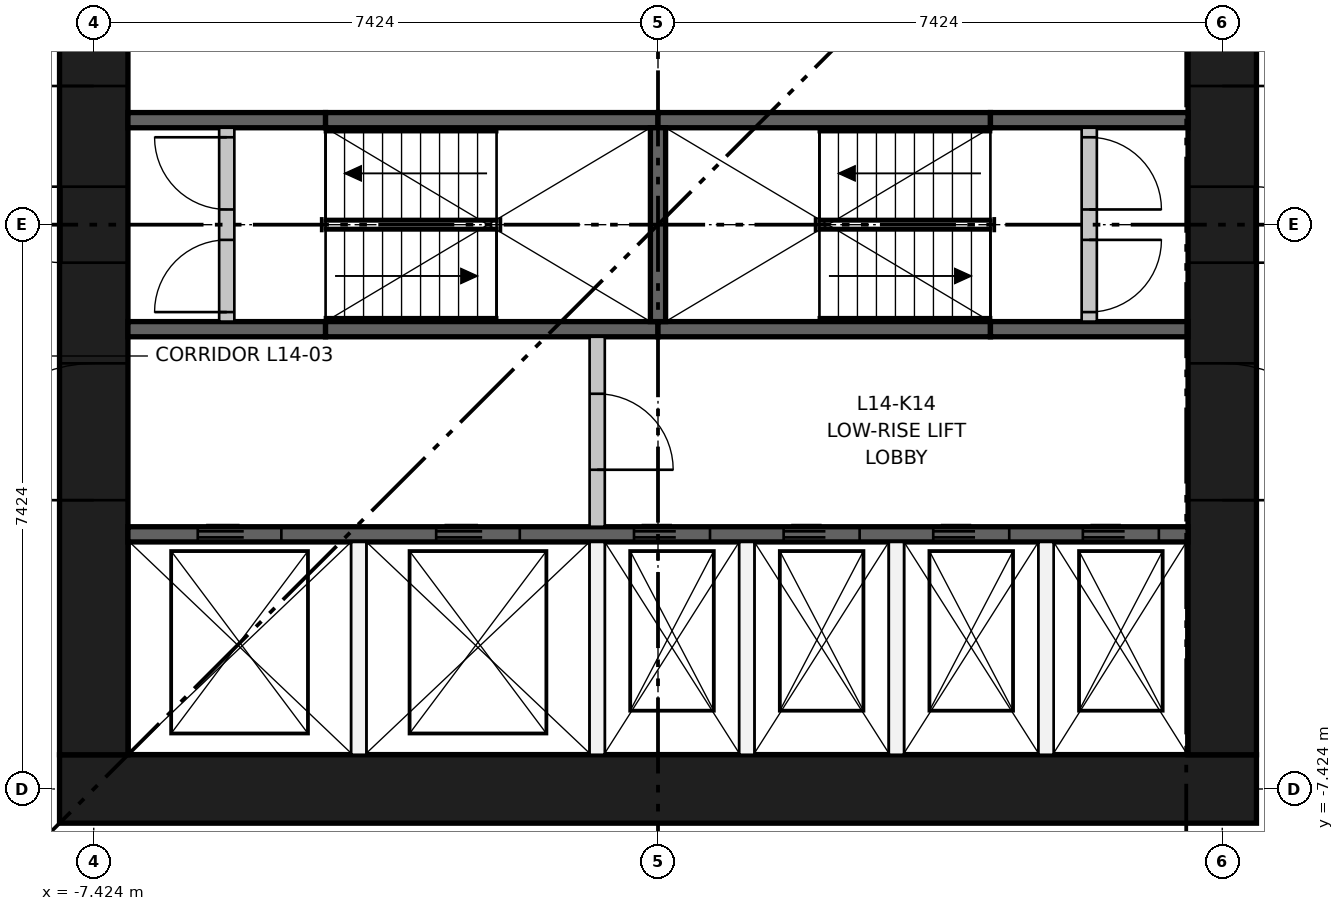
"""IFC4 building model, lengths in metres.
Left out: names, types, materials, properties, quantities, classifications, styles, units other than length and angle.
Written with IfcOpenShell. Run it as: python <this file> out.ifc"""

import sys

from ifc_helpers import new_model, si_unit, direction, frame, frame_2d, origin, place, context, subcontext, project, spatial, rectangle, extrude, element, fill, save


model = new_model("IFC4")
c1 = context("Model", 3, precision=1e-05, world=origin(), true_north=direction((0.0, 1.0)))
c2 = subcontext(c1, "Body", "Model", "MODEL_VIEW")
j1 = project(units=[si_unit("LENGTHUNIT", "METRE"), si_unit("PLANEANGLEUNIT", "RADIAN")], contexts=[c1])
p1 = place(None, origin())
s1 = spatial("IfcSite", under=j1, at=p1, CompositionType="ELEMENT")
p2 = place(p1, origin())
s2 = spatial("IfcBuilding", under=s1, at=p2, CompositionType="ELEMENT")
p3 = place(p2, frame((0.0, 0.0, 55.4)))
s3 = spatial("IfcBuildingStorey", under=s2, at=p3, CompositionType="ELEMENT", Elevation=55.4)
p4 = place(p3, frame((-7.874, -7.424, 0.0), z_axis=(0.0, 0.0, 1.0), x_axis=(1.0, 0.0, 0.0)))
e1 = element("IfcWall", 1, at=p4, inside=s3, PredefinedType="SHEAR", context=c2, shape_type="SweptSolid", body=[
    extrude(rectangle(XDim=15.748, YDim=0.9, at=frame_2d((7.874, 0.0))), origin(), (0.0, 0.0, 1.0), 3.65),
])
p5 = place(p3, frame((-7.424, -6.974, 0.0), z_axis=(0.0, 0.0, 1.0), x_axis=(0.0, 1.0, 0.0)))
e2 = element("IfcWall", 2, at=p5, inside=s3, PredefinedType="SHEAR", context=c2, shape_type="SweptSolid", body=[
    extrude(rectangle(XDim=13.948, YDim=0.9, at=frame_2d((6.974, 0.0))), origin(), (0.0, 0.0, 1.0), 3.65),
])
p6 = place(p5, frame((6.474, 0.0, 0.0)))
e3 = element("IfcOpeningElement", 3, at=p6, cuts=e2, PredefinedType="OPENING", context=c2, shape_type="SweptSolid", body=[
    extrude(rectangle(XDim=1.0, YDim=2.1, at=frame_2d((0.5, 1.05))), frame((0.0, 0.46, 0.0), z_axis=(0.0, -1.0, 0.0), x_axis=(1.0, 0.0, 0.0)), (0.0, 0.0, 1.0), 0.92),
])
p7 = place(p5, frame((3.35, 0.0, 0.0)))
e4 = element("IfcOpeningElement", 4, at=p7, cuts=e2, PredefinedType="OPENING", context=c2, shape_type="SweptSolid", body=[
    extrude(rectangle(XDim=1.8, YDim=2.1, at=frame_2d((0.9, 1.05))), frame((0.0, 0.46, 0.0), z_axis=(0.0, -1.0, 0.0), x_axis=(1.0, 0.0, 0.0)), (0.0, 0.0, 1.0), 0.92),
])
p8 = place(p5, frame((8.799, 0.0, 0.0)))
e5 = element("IfcOpeningElement", 5, at=p8, cuts=e2, PredefinedType="OPENING", context=c2, shape_type="SweptSolid", body=[
    extrude(rectangle(XDim=1.8, YDim=2.1, at=frame_2d((0.9, 1.05))), frame((0.0, 0.46, 0.0), z_axis=(0.0, -1.0, 0.0), x_axis=(1.0, 0.0, 0.0)), (0.0, 0.0, 1.0), 0.92),
])
p9 = place(p5, frame((11.974, 0.0, 0.0)))
e6 = element("IfcOpeningElement", 6, at=p9, cuts=e2, PredefinedType="OPENING", context=c2, shape_type="SweptSolid", body=[
    extrude(rectangle(XDim=1.0, YDim=2.1, at=frame_2d((0.5, 1.05))), frame((0.0, 0.46, 0.0), z_axis=(0.0, -1.0, 0.0), x_axis=(1.0, 0.0, 0.0)), (0.0, 0.0, 1.0), 0.92),
])
p10 = place(p3, frame((7.424, -6.974, 0.0), z_axis=(0.0, 0.0, 1.0), x_axis=(0.0, 1.0, 0.0)))
e7 = element("IfcWall", 7, at=p10, inside=s3, PredefinedType="SHEAR", context=c2, shape_type="SweptSolid", body=[
    extrude(rectangle(XDim=13.948, YDim=0.9, at=frame_2d((6.974, 0.0))), origin(), (0.0, 0.0, 1.0), 3.65),
])
p11 = place(p10, frame((6.474, 0.0, 0.0)))
e8 = element("IfcOpeningElement", 8, at=p11, cuts=e7, PredefinedType="OPENING", context=c2, shape_type="SweptSolid", body=[
    extrude(rectangle(XDim=1.0, YDim=2.1, at=frame_2d((0.5, 1.05))), frame((0.0, 0.46, 0.0), z_axis=(0.0, -1.0, 0.0), x_axis=(1.0, 0.0, 0.0)), (0.0, 0.0, 1.0), 0.92),
])
p12 = place(p10, frame((3.35, 0.0, 0.0)))
e9 = element("IfcOpeningElement", 9, at=p12, cuts=e7, PredefinedType="OPENING", context=c2, shape_type="SweptSolid", body=[
    extrude(rectangle(XDim=1.8, YDim=2.1, at=frame_2d((0.9, 1.05))), frame((0.0, 0.46, 0.0), z_axis=(0.0, -1.0, 0.0), x_axis=(1.0, 0.0, 0.0)), (0.0, 0.0, 1.0), 0.92),
])
p13 = place(p10, frame((8.799, 0.0, 0.0)))
e10 = element("IfcOpeningElement", 10, at=p13, cuts=e7, PredefinedType="OPENING", context=c2, shape_type="SweptSolid", body=[
    extrude(rectangle(XDim=1.8, YDim=2.1, at=frame_2d((0.9, 1.05))), frame((0.0, 0.46, 0.0), z_axis=(0.0, -1.0, 0.0), x_axis=(1.0, 0.0, 0.0)), (0.0, 0.0, 1.0), 0.92),
])
p14 = place(p3, frame((-6.974, -4.074, 0.0), z_axis=(0.0, 0.0, 1.0), x_axis=(1.0, 0.0, 0.0)))
e11 = element("IfcWall", 11, at=p14, inside=s3, PredefinedType="SHEAR", context=c2, shape_type="SweptSolid", body=[
    extrude(rectangle(XDim=13.948, YDim=0.2, at=frame_2d((6.974, 0.0))), origin(), (0.0, 0.0, 1.0), 3.3),
])
p15 = place(p14, frame((0.918, 0.0, 0.0)))
e12 = element("IfcOpeningElement", 12, at=p15, cuts=e11, PredefinedType="OPENING", context=c2, shape_type="SweptSolid", body=[
    extrude(rectangle(XDim=1.1, YDim=2.1, at=frame_2d((0.55, 1.05))), frame((0.0, 0.11, 0.0), z_axis=(0.0, -1.0, 0.0), x_axis=(1.0, 0.0, 0.0)), (0.0, 0.0, 1.0), 0.22),
])
p16 = place(p14, frame((4.055, 0.0, 0.0)))
e13 = element("IfcOpeningElement", 13, at=p16, cuts=e11, PredefinedType="OPENING", context=c2, shape_type="SweptSolid", body=[
    extrude(rectangle(XDim=1.1, YDim=2.1, at=frame_2d((0.55, 1.05))), frame((0.0, 0.11, 0.0), z_axis=(0.0, -1.0, 0.0), x_axis=(1.0, 0.0, 0.0)), (0.0, 0.0, 1.0), 0.22),
])
p17 = place(p14, frame((6.658, 0.0, 0.0)))
e14 = element("IfcOpeningElement", 14, at=p17, cuts=e11, PredefinedType="OPENING", context=c2, shape_type="SweptSolid", body=[
    extrude(rectangle(XDim=1.0, YDim=2.1, at=frame_2d((0.5, 1.05))), frame((0.0, 0.11, 0.0), z_axis=(0.0, -1.0, 0.0), x_axis=(1.0, 0.0, 0.0)), (0.0, 0.0, 1.0), 0.22),
])
p18 = place(p14, frame((8.627, 0.0, 0.0)))
e15 = element("IfcOpeningElement", 15, at=p18, cuts=e11, PredefinedType="OPENING", context=c2, shape_type="SweptSolid", body=[
    extrude(rectangle(XDim=1.0, YDim=2.1, at=frame_2d((0.5, 1.05))), frame((0.0, 0.11, 0.0), z_axis=(0.0, -1.0, 0.0), x_axis=(1.0, 0.0, 0.0)), (0.0, 0.0, 1.0), 0.22),
])
p19 = place(p14, frame((10.595, 0.0, 0.0)))
e16 = element("IfcOpeningElement", 16, at=p19, cuts=e11, PredefinedType="OPENING", context=c2, shape_type="SweptSolid", body=[
    extrude(rectangle(XDim=1.0, YDim=2.1, at=frame_2d((0.5, 1.05))), frame((0.0, 0.11, 0.0), z_axis=(0.0, -1.0, 0.0), x_axis=(1.0, 0.0, 0.0)), (0.0, 0.0, 1.0), 0.22),
])
p20 = place(p14, frame((12.564, 0.0, 0.0)))
e17 = element("IfcOpeningElement", 17, at=p20, cuts=e11, PredefinedType="OPENING", context=c2, shape_type="SweptSolid", body=[
    extrude(rectangle(XDim=1.0, YDim=2.1, at=frame_2d((0.5, 1.05))), frame((0.0, 0.11, 0.0), z_axis=(0.0, -1.0, 0.0), x_axis=(1.0, 0.0, 0.0)), (0.0, 0.0, 1.0), 0.22),
])
p21 = place(p3, frame((-6.974, -1.375, 0.0), z_axis=(0.0, 0.0, 1.0), x_axis=(1.0, 0.0, 0.0)))
e18 = element("IfcWall", 18, at=p21, inside=s3, PredefinedType="SHEAR", context=c2, shape_type="SweptSolid", body=[
    extrude(rectangle(XDim=2.6, YDim=0.2, at=frame_2d((1.3, 0.0))), origin(), (0.0, 0.0, 1.0), 3.3),
])
for number, where, z_axis, x_axis in (
    (19, (-4.374, -1.375, 0.0), (0.0, 0.0, 1.0), (1.0, 0.0, 0.0)),
    (20, (0.0, -1.375, 0.0), (0.0, 0.0, 1.0), (1.0, 0.0, 0.0)),
):
    element("IfcWall", number, at=place(p3, frame(where, z_axis=z_axis, x_axis=x_axis)), inside=s3, PredefinedType="SHEAR", context=c2, shape_type="SweptSolid", body=[
        extrude(rectangle(XDim=4.374, YDim=0.2, at=frame_2d((2.187, 0.0))), origin(), (0.0, 0.0, 1.0), 3.3),
    ])
for number, where, z_axis, x_axis in (
    (21, (4.374, -1.375, 0.0), (0.0, 0.0, 1.0), (1.0, 0.0, 0.0)),
    (22, (-6.974, 1.375, 0.0), (0.0, 0.0, 1.0), (1.0, 0.0, 0.0)),
):
    element("IfcWall", number, at=place(p3, frame(where, z_axis=z_axis, x_axis=x_axis)), inside=s3, PredefinedType="SHEAR", context=c2, shape_type="SweptSolid", body=[
        extrude(rectangle(XDim=2.6, YDim=0.2, at=frame_2d((1.3, 0.0))), origin(), (0.0, 0.0, 1.0), 3.3),
    ])
for number, where, z_axis, x_axis in (
    (23, (-4.374, 1.375, 0.0), (0.0, 0.0, 1.0), (1.0, 0.0, 0.0)),
    (24, (0.0, 1.375, 0.0), (0.0, 0.0, 1.0), (1.0, 0.0, 0.0)),
):
    element("IfcWall", number, at=place(p3, frame(where, z_axis=z_axis, x_axis=x_axis)), inside=s3, PredefinedType="SHEAR", context=c2, shape_type="SweptSolid", body=[
        extrude(rectangle(XDim=4.374, YDim=0.2, at=frame_2d((2.187, 0.0))), origin(), (0.0, 0.0, 1.0), 3.3),
    ])
p22 = place(p3, frame((4.374, 1.375, 0.0), z_axis=(0.0, 0.0, 1.0), x_axis=(1.0, 0.0, 0.0)))
e25 = element("IfcWall", 25, at=p22, inside=s3, PredefinedType="SHEAR", context=c2, shape_type="SweptSolid", body=[
    extrude(rectangle(XDim=2.6, YDim=0.2, at=frame_2d((1.3, 0.0))), origin(), (0.0, 0.0, 1.0), 3.3),
])
p23 = place(p3, frame((0.0, -1.275, 0.0), z_axis=(0.0, 0.0, 1.0), x_axis=(0.0, 1.0, 0.0)))
e26 = element("IfcWall", 26, at=p23, inside=s3, PredefinedType="SHEAR", context=c2, shape_type="SweptSolid", body=[
    extrude(rectangle(XDim=2.55, YDim=0.2, at=frame_2d((1.275, 0.0))), origin(), (0.0, 0.0, 1.0), 3.3),
])
for number, where, z_axis, x_axis in (
    (27, (-3.937, -6.974, 0.0), (0.0, 0.0, 1.0), (0.0, 1.0, 0.0)),
    (28, (-0.8, -6.974, 0.0), (0.0, 0.0, 1.0), (0.0, 1.0, 0.0)),
):
    element("IfcWall", number, at=place(p3, frame(where, z_axis=z_axis, x_axis=x_axis)), inside=s3, PredefinedType="PARTITIONING", context=c2, shape_type="SweptSolid", body=[
        extrude(rectangle(XDim=2.8, YDim=0.2, at=frame_2d((1.4, 0.0))), origin(), (0.0, 0.0, 1.0), 3.3),
    ])
p24 = place(p3, frame((-0.8, -3.974, 0.0), z_axis=(0.0, 0.0, 1.0), x_axis=(0.0, 1.0, 0.0)))
e29 = element("IfcWall", 29, at=p24, inside=s3, PredefinedType="PARTITIONING", context=c2, shape_type="SweptSolid", body=[
    extrude(rectangle(XDim=2.499, YDim=0.2, at=frame_2d((1.25, 0.0))), origin(), (0.0, 0.0, 1.0), 3.3),
])
p25 = place(p24, frame((0.75, 0.0, 0.0)))
e30 = element("IfcOpeningElement", 30, at=p25, cuts=e29, PredefinedType="OPENING", context=c2, shape_type="SweptSolid", body=[
    extrude(rectangle(XDim=1.0, YDim=2.1, at=frame_2d((0.5, 1.05))), frame((0.0, 0.11, 0.0), z_axis=(0.0, -1.0, 0.0), x_axis=(1.0, 0.0, 0.0)), (0.0, 0.0, 1.0), 0.22),
])
for number, where, z_axis, x_axis in (
    (31, (1.168, -6.974, 0.0), (0.0, 0.0, 1.0), (0.0, 1.0, 0.0)),
    (32, (3.137, -6.974, 0.0), (0.0, 0.0, 1.0), (0.0, 1.0, 0.0)),
    (33, (5.105, -6.974, 0.0), (0.0, 0.0, 1.0), (0.0, 1.0, 0.0)),
):
    element("IfcWall", number, at=place(p3, frame(where, z_axis=z_axis, x_axis=x_axis)), inside=s3, PredefinedType="PARTITIONING", context=c2, shape_type="SweptSolid", body=[
        extrude(rectangle(XDim=2.8, YDim=0.2, at=frame_2d((1.4, 0.0))), origin(), (0.0, 0.0, 1.0), 3.3),
    ])
p26 = place(p3, frame((-5.674, -1.275, 0.0), z_axis=(0.0, 0.0, 1.0), x_axis=(0.0, 1.0, 0.0)))
e34 = element("IfcWall", 34, at=p26, inside=s3, PredefinedType="PARTITIONING", context=c2, shape_type="SweptSolid", body=[
    extrude(rectangle(XDim=2.55, YDim=0.2, at=frame_2d((1.275, 0.0))), origin(), (0.0, 0.0, 1.0), 3.3),
])
p27 = place(p26, frame((0.125, 0.0, 0.0)))
e35 = element("IfcOpeningElement", 35, at=p27, cuts=e34, PredefinedType="OPENING", context=c2, shape_type="SweptSolid", body=[
    extrude(rectangle(XDim=0.95, YDim=2.1, at=frame_2d((0.475, 1.05))), frame((0.0, 0.11, 0.0), z_axis=(0.0, -1.0, 0.0), x_axis=(1.0, 0.0, 0.0)), (0.0, 0.0, 1.0), 0.22),
])
p28 = place(p26, frame((1.475, 0.0, 0.0)))
e36 = element("IfcOpeningElement", 36, at=p28, cuts=e34, PredefinedType="OPENING", context=c2, shape_type="SweptSolid", body=[
    extrude(rectangle(XDim=0.95, YDim=2.1, at=frame_2d((0.475, 1.05))), frame((0.0, 0.11, 0.0), z_axis=(0.0, -1.0, 0.0), x_axis=(1.0, 0.0, 0.0)), (0.0, 0.0, 1.0), 0.22),
])
p29 = place(p3, frame((5.674, -1.275, 0.0), z_axis=(0.0, 0.0, 1.0), x_axis=(0.0, 1.0, 0.0)))
e37 = element("IfcWall", 37, at=p29, inside=s3, PredefinedType="PARTITIONING", context=c2, shape_type="SweptSolid", body=[
    extrude(rectangle(XDim=2.55, YDim=0.2, at=frame_2d((1.275, 0.0))), origin(), (0.0, 0.0, 1.0), 3.3),
])
p30 = place(p29, frame((0.125, 0.0, 0.0)))
e38 = element("IfcOpeningElement", 38, at=p30, cuts=e37, PredefinedType="OPENING", context=c2, shape_type="SweptSolid", body=[
    extrude(rectangle(XDim=0.95, YDim=2.1, at=frame_2d((0.475, 1.05))), frame((0.0, 0.11, 0.0), z_axis=(0.0, -1.0, 0.0), x_axis=(1.0, 0.0, 0.0)), (0.0, 0.0, 1.0), 0.22),
])
p31 = place(p29, frame((1.475, 0.0, 0.0)))
e39 = element("IfcOpeningElement", 39, at=p31, cuts=e37, PredefinedType="OPENING", context=c2, shape_type="SweptSolid", body=[
    extrude(rectangle(XDim=0.95, YDim=2.1, at=frame_2d((0.475, 1.05))), frame((0.0, 0.11, 0.0), z_axis=(0.0, -1.0, 0.0), x_axis=(1.0, 0.0, 0.0)), (0.0, 0.0, 1.0), 0.22),
])
p32 = place(p15, origin())
e40 = element("IfcDoor", 40, at=p32, inside=s3, OperationType="DOUBLE_DOOR_SLIDING", PredefinedType="DOOR", context=c2, shape_type="SweptSolid", body=[
    extrude(rectangle(XDim=1.1, YDim=2.1, at=frame_2d((0.55, 1.05))), frame((0.0, 0.025, 0.0), z_axis=(0.0, -1.0, 0.0), x_axis=(1.0, 0.0, 0.0)), (0.0, 0.0, 1.0), 0.05),
])
fill(e12, e40)
p33 = place(p16, origin())
e41 = element("IfcDoor", 41, at=p33, inside=s3, OperationType="DOUBLE_DOOR_SLIDING", PredefinedType="DOOR", context=c2, shape_type="SweptSolid", body=[
    extrude(rectangle(XDim=1.1, YDim=2.1, at=frame_2d((0.55, 1.05))), frame((0.0, 0.025, 0.0), z_axis=(0.0, -1.0, 0.0), x_axis=(1.0, 0.0, 0.0)), (0.0, 0.0, 1.0), 0.05),
])
fill(e13, e41)
p34 = place(p17, origin())
e42 = element("IfcDoor", 42, at=p34, inside=s3, OperationType="DOUBLE_DOOR_SLIDING", PredefinedType="DOOR", context=c2, shape_type="SweptSolid", body=[
    extrude(rectangle(XDim=1.0, YDim=2.1, at=frame_2d((0.5, 1.05))), frame((0.0, 0.025, 0.0), z_axis=(0.0, -1.0, 0.0), x_axis=(1.0, 0.0, 0.0)), (0.0, 0.0, 1.0), 0.05),
])
fill(e14, e42)
p35 = place(p18, origin())
e43 = element("IfcDoor", 43, at=p35, inside=s3, OperationType="DOUBLE_DOOR_SLIDING", PredefinedType="DOOR", context=c2, shape_type="SweptSolid", body=[
    extrude(rectangle(XDim=1.0, YDim=2.1, at=frame_2d((0.5, 1.05))), frame((0.0, 0.025, 0.0), z_axis=(0.0, -1.0, 0.0), x_axis=(1.0, 0.0, 0.0)), (0.0, 0.0, 1.0), 0.05),
])
fill(e15, e43)
p36 = place(p19, origin())
e44 = element("IfcDoor", 44, at=p36, inside=s3, OperationType="DOUBLE_DOOR_SLIDING", PredefinedType="DOOR", context=c2, shape_type="SweptSolid", body=[
    extrude(rectangle(XDim=1.0, YDim=2.1, at=frame_2d((0.5, 1.05))), frame((0.0, 0.025, 0.0), z_axis=(0.0, -1.0, 0.0), x_axis=(1.0, 0.0, 0.0)), (0.0, 0.0, 1.0), 0.05),
])
fill(e16, e44)
p37 = place(p20, origin())
e45 = element("IfcDoor", 45, at=p37, inside=s3, OperationType="DOUBLE_DOOR_SLIDING", PredefinedType="DOOR", context=c2, shape_type="SweptSolid", body=[
    extrude(rectangle(XDim=1.0, YDim=2.1, at=frame_2d((0.5, 1.05))), frame((0.0, 0.025, 0.0), z_axis=(0.0, -1.0, 0.0), x_axis=(1.0, 0.0, 0.0)), (0.0, 0.0, 1.0), 0.05),
])
fill(e17, e45)
p38 = place(p27, origin())
e46 = element("IfcDoor", 46, at=p38, inside=s3, OperationType="SINGLE_SWING_LEFT", PredefinedType="DOOR", context=c2, shape_type="SweptSolid", body=[
    extrude(rectangle(XDim=0.95, YDim=2.1, at=frame_2d((0.475, 1.05))), frame((0.0, 0.025, 0.0), z_axis=(0.0, -1.0, 0.0), x_axis=(1.0, 0.0, 0.0)), (0.0, 0.0, 1.0), 0.05),
])
fill(e35, e46)
p39 = place(p28, origin())
e47 = element("IfcDoor", 47, at=p39, inside=s3, OperationType="SINGLE_SWING_RIGHT", PredefinedType="DOOR", context=c2, shape_type="SweptSolid", body=[
    extrude(rectangle(XDim=0.95, YDim=2.1, at=frame_2d((0.475, 1.05))), frame((0.0, 0.025, 0.0), z_axis=(0.0, -1.0, 0.0), x_axis=(1.0, 0.0, 0.0)), (0.0, 0.0, 1.0), 0.05),
])
fill(e36, e47)
p40 = place(p30, frame((0.95, 0.0, 0.0), z_axis=(0.0, 0.0, 1.0), x_axis=(-1.0, 0.0, 0.0)))
e48 = element("IfcDoor", 48, at=p40, inside=s3, OperationType="SINGLE_SWING_RIGHT", PredefinedType="DOOR", context=c2, shape_type="SweptSolid", body=[
    extrude(rectangle(XDim=0.95, YDim=2.1, at=frame_2d((0.475, 1.05))), frame((0.0, 0.025, 0.0), z_axis=(0.0, -1.0, 0.0), x_axis=(1.0, 0.0, 0.0)), (0.0, 0.0, 1.0), 0.05),
])
fill(e38, e48)
p41 = place(p31, frame((0.95, 0.0, 0.0), z_axis=(0.0, 0.0, 1.0), x_axis=(-1.0, 0.0, 0.0)))
e49 = element("IfcDoor", 49, at=p41, inside=s3, OperationType="SINGLE_SWING_LEFT", PredefinedType="DOOR", context=c2, shape_type="SweptSolid", body=[
    extrude(rectangle(XDim=0.95, YDim=2.1, at=frame_2d((0.475, 1.05))), frame((0.0, 0.025, 0.0), z_axis=(0.0, -1.0, 0.0), x_axis=(1.0, 0.0, 0.0)), (0.0, 0.0, 1.0), 0.05),
])
fill(e39, e49)
p42 = place(p25, frame((1.0, 0.0, 0.0), z_axis=(0.0, 0.0, 1.0), x_axis=(-1.0, 0.0, 0.0)))
e50 = element("IfcDoor", 50, at=p42, inside=s3, OperationType="SINGLE_SWING_LEFT", PredefinedType="DOOR", context=c2, shape_type="SweptSolid", body=[
    extrude(rectangle(XDim=1.0, YDim=2.1, at=frame_2d((0.5, 1.05))), frame((0.0, 0.025, 0.0), z_axis=(0.0, -1.0, 0.0), x_axis=(1.0, 0.0, 0.0)), (0.0, 0.0, 1.0), 0.05),
])
fill(e30, e50)
p43 = place(p6, origin())
e51 = element("IfcDoor", 51, at=p43, inside=s3, OperationType="SINGLE_SWING_RIGHT", PredefinedType="DOOR", context=c2, shape_type="SweptSolid", body=[
    extrude(rectangle(XDim=1.0, YDim=2.1, at=frame_2d((0.5, 1.05))), frame((0.0, 0.45, 0.0), z_axis=(0.0, -1.0, 0.0), x_axis=(1.0, 0.0, 0.0)), (0.0, 0.0, 1.0), 0.05),
])
fill(e3, e51)
p44 = place(p7, origin())
e52 = element("IfcDoor", 52, at=p44, inside=s3, OperationType="DOUBLE_DOOR_SINGLE_SWING", PredefinedType="DOOR", context=c2, shape_type="SweptSolid", body=[
    extrude(rectangle(XDim=1.8, YDim=2.1, at=frame_2d((0.9, 1.05))), frame((0.0, 0.025, 0.0), z_axis=(0.0, -1.0, 0.0), x_axis=(1.0, 0.0, 0.0)), (0.0, 0.0, 1.0), 0.05),
])
fill(e4, e52)
p45 = place(p8, origin())
e53 = element("IfcDoor", 53, at=p45, inside=s3, OperationType="DOUBLE_DOOR_SINGLE_SWING", PredefinedType="DOOR", context=c2, shape_type="SweptSolid", body=[
    extrude(rectangle(XDim=1.8, YDim=2.1, at=frame_2d((0.9, 1.05))), frame((0.0, 0.025, 0.0), z_axis=(0.0, -1.0, 0.0), x_axis=(1.0, 0.0, 0.0)), (0.0, 0.0, 1.0), 0.05),
])
fill(e5, e53)
p46 = place(p11, frame((1.0, 0.0, 0.0), z_axis=(0.0, 0.0, 1.0), x_axis=(-1.0, 0.0, 0.0)))
e54 = element("IfcDoor", 54, at=p46, inside=s3, OperationType="SINGLE_SWING_LEFT", PredefinedType="DOOR", context=c2, shape_type="SweptSolid", body=[
    extrude(rectangle(XDim=1.0, YDim=2.1, at=frame_2d((0.5, 1.05))), frame((0.0, 0.45, 0.0), z_axis=(0.0, -1.0, 0.0), x_axis=(1.0, 0.0, 0.0)), (0.0, 0.0, 1.0), 0.05),
])
fill(e8, e54)
p47 = place(p12, frame((1.8, 0.0, 0.0), z_axis=(0.0, 0.0, 1.0), x_axis=(-1.0, 0.0, 0.0)))
e55 = element("IfcDoor", 55, at=p47, inside=s3, OperationType="DOUBLE_DOOR_SINGLE_SWING", PredefinedType="DOOR", context=c2, shape_type="SweptSolid", body=[
    extrude(rectangle(XDim=1.8, YDim=2.1, at=frame_2d((0.9, 1.05))), frame((0.0, 0.025, 0.0), z_axis=(0.0, -1.0, 0.0), x_axis=(1.0, 0.0, 0.0)), (0.0, 0.0, 1.0), 0.05),
])
fill(e9, e55)
p48 = place(p13, frame((1.8, 0.0, 0.0), z_axis=(0.0, 0.0, 1.0), x_axis=(-1.0, 0.0, 0.0)))
e56 = element("IfcDoor", 56, at=p48, inside=s3, OperationType="DOUBLE_DOOR_SINGLE_SWING", PredefinedType="DOOR", context=c2, shape_type="SweptSolid", body=[
    extrude(rectangle(XDim=1.8, YDim=2.1, at=frame_2d((0.9, 1.05))), frame((0.0, 0.025, 0.0), z_axis=(0.0, -1.0, 0.0), x_axis=(1.0, 0.0, 0.0)), (0.0, 0.0, 1.0), 0.05),
])
fill(e10, e56)
save(model, sys.argv[1])
